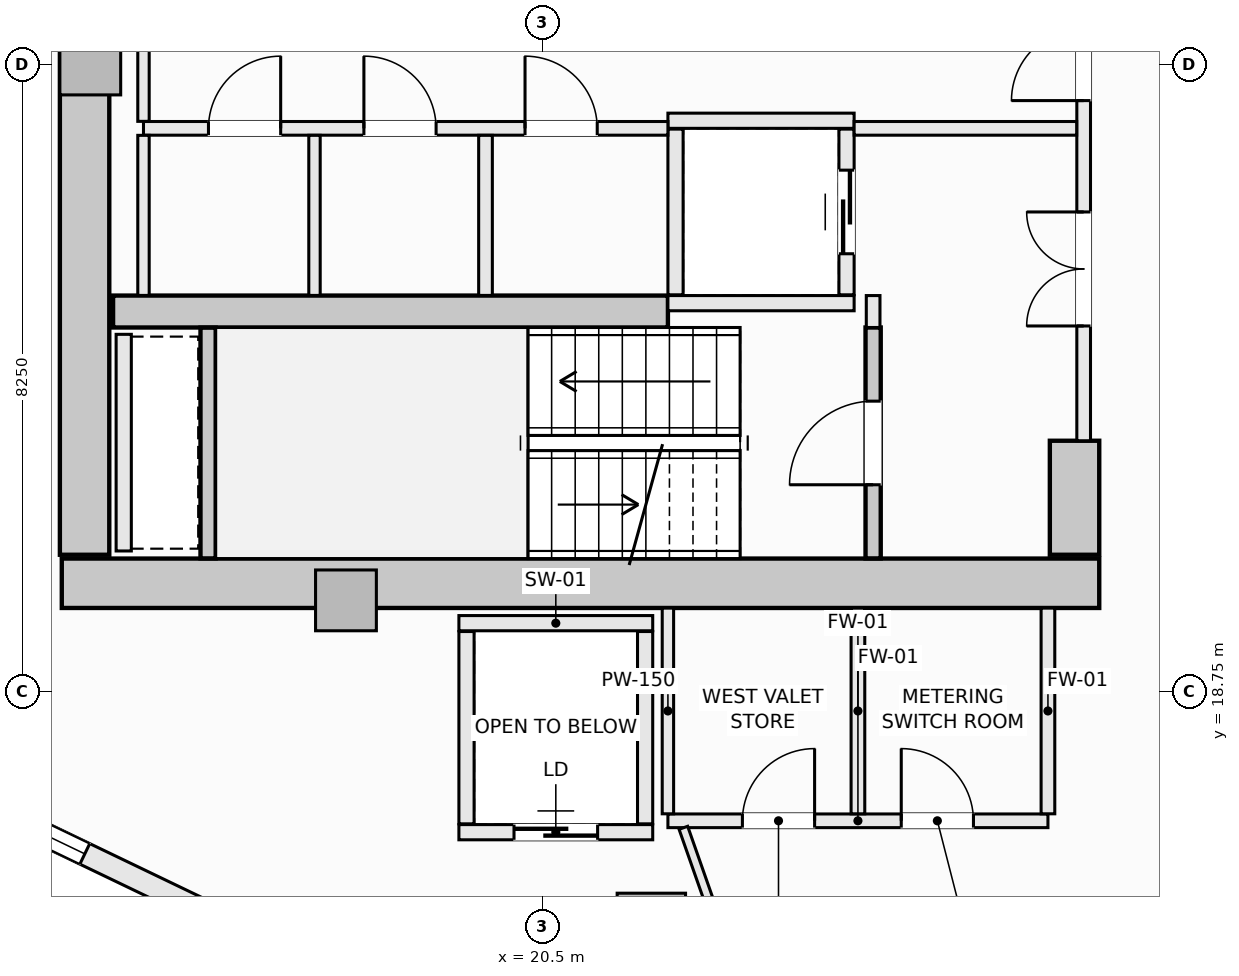
"""IFC4 building model, lengths in metres.
Left out: names, types, materials, properties, quantities, classifications, styles, units other than length and angle.
Written with IfcOpenShell. Run it as: python <this file> out.ifc"""

import sys

from ifc_helpers import new_model, si_unit, direction, frame, frame_2d, origin, origin_2d, place, context, subcontext, project, spatial, rectangle, extrude, element, fill, save


model = new_model("IFC4")
c1 = context("Model", 3, precision=1e-05, world=origin(), true_north=direction((0.0, 1.0)))
c2 = subcontext(c1, "Body", "Model", "MODEL_VIEW")
j1 = project(units=[si_unit("LENGTHUNIT", "METRE"), si_unit("PLANEANGLEUNIT", "RADIAN")], contexts=[c1])
p1 = place(None, origin())
s1 = spatial("IfcSite", under=j1, at=p1, CompositionType="ELEMENT")
p2 = place(p1, origin())
s2 = spatial("IfcBuilding", under=s1, at=p2, CompositionType="ELEMENT")
p3 = place(p2, frame((0.0, 0.0, 159.7)))
s3 = spatial("IfcBuildingStorey", under=s2, at=p3, CompositionType="ELEMENT", Elevation=159.7)
p4 = place(p3, frame((14.175, 20.175, -0.27), z_axis=(0.0, 0.0, 1.0), x_axis=(1.0, 0.0, 0.0)))
e1 = element("IfcWall", 1, at=p4, inside=s3, PredefinedType="SHEAR", context=c2, shape_type="SweptSolid", body=[
    extrude(rectangle(XDim=13.65, YDim=0.65, at=frame_2d((6.825, 0.0))), origin(), (0.0, 0.0, 1.0), 3.4),
])
p5 = place(p3, frame((14.475, 20.55, -0.27), z_axis=(0.0, 0.0, 1.0), x_axis=(0.0, 1.0, 0.0)))
e2 = element("IfcWall", 2, at=p5, inside=s3, PredefinedType="SHEAR", context=c2, shape_type="SweptSolid", body=[
    extrude(rectangle(XDim=12.9, YDim=0.65, at=frame_2d((6.45, 0.0))), origin(), (0.0, 0.0, 1.0), 3.4),
])
p6 = place(p3, frame((27.5, 20.55, -0.27), z_axis=(0.0, 0.0, 1.0), x_axis=(0.0, 1.0, 0.0)))
e3 = element("IfcWall", 3, at=p6, inside=s3, PredefinedType="SHEAR", context=c2, shape_type="SweptSolid", body=[
    extrude(rectangle(XDim=1.5, YDim=0.65, at=frame_2d((0.75, 0.0))), origin(), (0.0, 0.0, 1.0), 3.4),
])
p7 = place(p3, frame((14.85, 23.75, -0.27), z_axis=(0.0, 0.0, 1.0), x_axis=(1.0, 0.0, 0.0)))
e4 = element("IfcWall", 4, at=p7, inside=s3, PredefinedType="SHEAR", context=c2, shape_type="SweptSolid", body=[
    extrude(rectangle(XDim=7.3, YDim=0.42, at=frame_2d((3.65, 0.0))), origin(), (0.0, 0.0, 1.0), 3.4),
])
p8 = place(p3, frame((21.932, 15.648, -0.27), z_axis=(0.0, 0.0, 1.0), x_axis=(1.0, 0.0, 0.0)))
e5 = element("IfcColumn", 5, at=p8, inside=s3, PredefinedType="COLUMN", context=c2, shape_type="SweptSolid", body=[
    extrude(rectangle(XDim=0.9, YDim=0.9, at=origin_2d()), origin(), (0.0, 0.0, 1.0), 3.4),
])
for number, where, z_axis, x_axis in (
    (6, (14.55, 27.0, -0.27), (0.0, 0.0, 1.0), (1.0, 0.0, 0.0)),
    (7, (17.914, 19.95, -0.27), (0.0, 0.0, 1.0), (1.0, 0.0, 0.0)),
):
    element("IfcColumn", number, at=place(p3, frame(where, z_axis=z_axis, x_axis=x_axis)), inside=s3, PredefinedType="PILASTER", context=c2, shape_type="SweptSolid", body=[
        extrude(rectangle(XDim=0.8, YDim=0.8, at=origin_2d()), origin(), (0.0, 0.0, 1.0), 3.4),
    ])
p9 = place(p3, frame((11.127, 18.225, 0.0), z_axis=(0.0, 0.0, 1.0), x_axis=(0.901353070301, -0.433085029363, 0.0)))
e8 = element("IfcWall", 8, at=p9, inside=s3, PredefinedType="SOLIDWALL", context=c2, shape_type="SweptSolid", body=[
    extrude(rectangle(XDim=5.336, YDim=0.3, at=frame_2d((2.668, 0.0))), origin(), (0.0, 0.0, 1.0), 2.653),
])
p10 = place(p9, frame((1.618, 0.0, 0.74)))
e9 = element("IfcOpeningElement", 9, at=p10, cuts=e8, PredefinedType="OPENING", context=c2, shape_type="SweptSolid", body=[
    extrude(rectangle(XDim=2.1, YDim=1.7, at=frame_2d((1.05, 0.85))), frame((0.0, 0.16, 0.0), z_axis=(0.0, -1.0, 0.0), x_axis=(1.0, 0.0, 0.0)), (0.0, 0.0, 1.0), 0.32),
])
p11 = place(p3, frame((24.85, 20.502, -0.27), z_axis=(0.0, 0.0, 1.0), x_axis=(0.0, 1.0, 0.0)))
e10 = element("IfcWall", 10, at=p11, inside=s3, PredefinedType="SHEAR", context=c2, shape_type="SweptSolid", body=[
    extrude(rectangle(XDim=3.038, YDim=0.2, at=frame_2d((1.519, 0.0))), origin(), (0.0, 0.0, 1.0), 3.4),
])
p12 = place(p11, frame((0.969, 0.0, 0.27)))
e11 = element("IfcOpeningElement", 11, at=p12, cuts=e10, PredefinedType="OPENING", context=c2, shape_type="SweptSolid", body=[
    extrude(rectangle(XDim=1.1, YDim=2.15, at=frame_2d((0.55, 1.075))), frame((0.0, 0.11, 0.0), z_axis=(0.0, -1.0, 0.0), x_axis=(1.0, 0.0, 0.0)), (0.0, 0.0, 1.0), 0.22),
])
p13 = place(p3, frame((16.1, 20.502, -0.27), z_axis=(0.0, 0.0, 1.0), x_axis=(0.0, 1.0, 0.0)))
e12 = element("IfcWall", 12, at=p13, inside=s3, PredefinedType="SHEAR", context=c2, shape_type="SweptSolid", body=[
    extrude(rectangle(XDim=3.036, YDim=0.2, at=frame_2d((1.518, 0.0))), origin(), (0.0, 0.0, 1.0), 3.4),
])
for number, where, z_axis, x_axis in (
    (13, (22.15, 26.26, 0.0), (0.0, 0.0, 1.0), (1.0, 0.0, 0.0)),
    (14, (22.15, 23.86, 0.0), (0.0, 0.0, 1.0), (1.0, 0.0, 0.0)),
):
    element("IfcWall", number, at=place(p3, frame(where, z_axis=z_axis, x_axis=x_axis)), inside=s3, PredefinedType="SOLIDWALL", context=c2, shape_type="SweptSolid", body=[
        extrude(rectangle(XDim=2.45, YDim=0.2, at=frame_2d((1.225, 0.0))), origin(), (0.0, 0.0, 1.0), 3.13),
    ])
p14 = place(p3, frame((22.25, 23.97, 0.0), z_axis=(0.0, 0.0, 1.0), x_axis=(0.0, 1.0, 0.0)))
e15 = element("IfcWall", 15, at=p14, inside=s3, PredefinedType="SOLIDWALL", context=c2, shape_type="SweptSolid", body=[
    extrude(rectangle(XDim=2.18, YDim=0.2, at=frame_2d((1.09, 0.0))), origin(), (0.0, 0.0, 1.0), 3.13),
])
p15 = place(p3, frame((24.5, 23.97, 0.0), z_axis=(0.0, 0.0, 1.0), x_axis=(0.0, 1.0, 0.0)))
e16 = element("IfcWall", 16, at=p15, inside=s3, PredefinedType="SOLIDWALL", context=c2, shape_type="SweptSolid", body=[
    extrude(rectangle(XDim=2.18, YDim=0.2, at=frame_2d((1.09, 0.0))), origin(), (0.0, 0.0, 1.0), 3.13),
])
p16 = place(p15, frame((0.54, 0.0, 0.0)))
e17 = element("IfcOpeningElement", 17, at=p16, cuts=e16, PredefinedType="OPENING", context=c2, shape_type="SweptSolid", body=[
    extrude(rectangle(XDim=1.1, YDim=2.2, at=frame_2d((0.55, 1.1))), frame((0.0, 0.11, 0.0), z_axis=(0.0, -1.0, 0.0), x_axis=(1.0, 0.0, 0.0)), (0.0, 0.0, 1.0), 0.22),
])
p17 = place(p3, frame((19.4, 19.65, 0.0), z_axis=(0.0, 0.0, 1.0), x_axis=(1.0, 0.0, 0.0)))
e18 = element("IfcWall", 18, at=p17, inside=s3, PredefinedType="SOLIDWALL", context=c2, shape_type="SweptSolid", body=[
    extrude(rectangle(XDim=2.55, YDim=0.2, at=frame_2d((1.275, 0.0))), origin(), (0.0, 0.0, 1.0), 3.13),
])
p18 = place(p3, frame((19.4, 16.9, 0.0), z_axis=(0.0, 0.0, 1.0), x_axis=(1.0, 0.0, 0.0)))
e19 = element("IfcWall", 19, at=p18, inside=s3, PredefinedType="SOLIDWALL", context=c2, shape_type="SweptSolid", body=[
    extrude(rectangle(XDim=2.55, YDim=0.2, at=frame_2d((1.275, 0.0))), origin(), (0.0, 0.0, 1.0), 3.13),
])
p19 = place(p18, frame((0.725, 0.0, 0.0)))
e20 = element("IfcOpeningElement", 20, at=p19, cuts=e19, PredefinedType="OPENING", context=c2, shape_type="SweptSolid", body=[
    extrude(rectangle(XDim=1.1, YDim=2.2, at=frame_2d((0.55, 1.1))), frame((0.0, 0.11, 0.0), z_axis=(0.0, -1.0, 0.0), x_axis=(1.0, 0.0, 0.0)), (0.0, 0.0, 1.0), 0.22),
])
for number, where, z_axis, x_axis in (
    (21, (19.5, 17.01, 0.0), (0.0, 0.0, 1.0), (0.0, 1.0, 0.0)),
    (22, (21.85, 17.01, 0.0), (0.0, 0.0, 1.0), (0.0, 1.0, 0.0)),
):
    element("IfcWall", number, at=place(p3, frame(where, z_axis=z_axis, x_axis=x_axis)), inside=s3, PredefinedType="SOLIDWALL", context=c2, shape_type="SweptSolid", body=[
        extrude(rectangle(XDim=2.53, YDim=0.2, at=frame_2d((1.265, 0.0))), origin(), (0.0, 0.0, 1.0), 3.13),
    ])
p20 = place(p3, frame((14.99, 20.6, 0.0), z_axis=(0.0, 0.0, 1.0), x_axis=(0.0, 1.0, 0.0)))
e23 = element("IfcWall", 23, at=p20, inside=s3, PredefinedType="SOLIDWALL", context=c2, shape_type="SweptSolid", body=[
    extrude(rectangle(XDim=2.85, YDim=0.2, at=frame_2d((1.425, 0.0))), origin(), (0.0, 0.0, 1.0), 3.13),
])
p21 = place(p3, frame((24.85, 23.54, 0.0), z_axis=(0.0, 0.0, 1.0), x_axis=(0.0, 1.0, 0.0)))
e24 = element("IfcWall", 24, at=p21, inside=s3, PredefinedType="SOLIDWALL", context=c2, shape_type="SweptSolid", body=[
    extrude(rectangle(XDim=0.42, YDim=0.18, at=frame_2d((0.21, 0.0))), origin(), (0.0, 0.0, 1.0), 3.13),
])
p22 = place(p3, frame((27.62, 22.05, 0.0), z_axis=(0.0, 0.0, 1.0), x_axis=(0.0, 1.0, 0.0)))
e25 = element("IfcWall", 25, at=p22, inside=s3, PredefinedType="SOLIDWALL", context=c2, shape_type="SweptSolid", body=[
    extrude(rectangle(XDim=9.9, YDim=0.18, at=frame_2d((4.95, 0.0))), origin(), (0.0, 0.0, 1.0), 3.13),
])
p23 = place(p22, frame((4.475, 0.0, 0.0)))
e26 = element("IfcOpeningElement", 26, at=p23, cuts=e25, PredefinedType="OPENING", context=c2, shape_type="SweptSolid", body=[
    extrude(rectangle(XDim=0.95, YDim=2.1, at=frame_2d((0.475, 1.05))), frame((0.0, 0.1, 0.0), z_axis=(0.0, -1.0, 0.0), x_axis=(1.0, 0.0, 0.0)), (0.0, 0.0, 1.0), 0.2),
])
p24 = place(p22, frame((6.89, 0.0, 0.0)))
e27 = element("IfcOpeningElement", 27, at=p24, cuts=e25, PredefinedType="OPENING", context=c2, shape_type="SweptSolid", body=[
    extrude(rectangle(XDim=1.5, YDim=2.2, at=frame_2d((0.75, 1.1))), frame((0.0, 0.1, 0.0), z_axis=(0.0, -1.0, 0.0), x_axis=(1.0, 0.0, 0.0)), (0.0, 0.0, 1.0), 0.2),
])
p25 = place(p22, frame((1.51, 0.0, 0.0)))
e28 = element("IfcOpeningElement", 28, at=p25, cuts=e25, PredefinedType="OPENING", context=c2, shape_type="SweptSolid", body=[
    extrude(rectangle(XDim=1.5, YDim=2.2, at=frame_2d((0.75, 1.1))), frame((0.0, 0.1, 0.0), z_axis=(0.0, -1.0, 0.0), x_axis=(1.0, 0.0, 0.0)), (0.0, 0.0, 1.0), 0.2),
])
p26 = place(p3, frame((15.25, 26.16, 0.0), z_axis=(0.0, 0.0, 1.0), x_axis=(1.0, 0.0, 0.0)))
e29 = element("IfcWall", 29, at=p26, inside=s3, PredefinedType="SOLIDWALL", context=c2, shape_type="SweptSolid", body=[
    extrude(rectangle(XDim=6.9, YDim=0.18, at=frame_2d((3.45, 0.0))), origin(), (0.0, 0.0, 1.0), 3.13),
])
p27 = place(p26, frame((5.02, 0.0, 0.0)))
e30 = element("IfcOpeningElement", 30, at=p27, cuts=e29, PredefinedType="OPENING", context=c2, shape_type="SweptSolid", body=[
    extrude(rectangle(XDim=0.95, YDim=2.1, at=frame_2d((0.475, 1.05))), frame((0.0, 0.1, 0.0), z_axis=(0.0, -1.0, 0.0), x_axis=(1.0, 0.0, 0.0)), (0.0, 0.0, 1.0), 0.2),
])
p28 = place(p26, frame((0.855, 0.0, 0.0)))
e31 = element("IfcOpeningElement", 31, at=p28, cuts=e29, PredefinedType="OPENING", context=c2, shape_type="SweptSolid", body=[
    extrude(rectangle(XDim=0.95, YDim=2.1, at=frame_2d((0.475, 1.05))), frame((0.0, 0.1, 0.0), z_axis=(0.0, -1.0, 0.0), x_axis=(1.0, 0.0, 0.0)), (0.0, 0.0, 1.0), 0.2),
])
p29 = place(p26, frame((2.9, 0.0, 0.0)))
e32 = element("IfcOpeningElement", 32, at=p29, cuts=e29, PredefinedType="OPENING", context=c2, shape_type="SweptSolid", body=[
    extrude(rectangle(XDim=0.95, YDim=2.1, at=frame_2d((0.475, 1.05))), frame((0.0, 0.1, 0.0), z_axis=(0.0, -1.0, 0.0), x_axis=(1.0, 0.0, 0.0)), (0.0, 0.0, 1.0), 0.2),
])
p30 = place(p3, frame((24.6, 26.16, 0.0), z_axis=(0.0, 0.0, 1.0), x_axis=(1.0, 0.0, 0.0)))
e33 = element("IfcWall", 33, at=p30, inside=s3, PredefinedType="SOLIDWALL", context=c2, shape_type="SweptSolid", body=[
    extrude(rectangle(XDim=2.928, YDim=0.18, at=frame_2d((1.464, 0.0))), origin(), (0.0, 0.0, 1.0), 3.13),
])
p31 = place(p3, frame((15.25, 23.962, 0.0), z_axis=(0.0, 0.0, 1.0), x_axis=(0.0, 1.0, 0.0)))
e34 = element("IfcWall", 34, at=p31, inside=s3, PredefinedType="PARTITIONING", context=c2, shape_type="SweptSolid", body=[
    extrude(rectangle(XDim=2.106, YDim=0.15, at=frame_2d((1.053, 0.0))), origin(), (0.0, 0.0, 1.0), 3.13),
])
p32 = place(p3, frame((15.25, 26.252, 0.0), z_axis=(0.0, 0.0, 1.0), x_axis=(0.0, 1.0, 0.0)))
e35 = element("IfcWall", 35, at=p32, inside=s3, PredefinedType="PARTITIONING", context=c2, shape_type="SweptSolid", body=[
    extrude(rectangle(XDim=1.496, YDim=0.15, at=frame_2d((0.748, 0.0))), origin(), (0.0, 0.0, 1.0), 3.13),
])
p33 = place(p3, frame((19.75, 23.962, 0.0), z_axis=(0.0, 0.0, 1.0), x_axis=(0.0, 1.0, 0.0)))
e36 = element("IfcWall", 36, at=p33, inside=s3, PredefinedType="SOLIDWALL", context=c2, shape_type="SweptSolid", body=[
    extrude(rectangle(XDim=2.106, YDim=0.18, at=frame_2d((1.053, 0.0))), origin(), (0.0, 0.0, 1.0), 3.13),
])
p34 = place(p3, frame((17.5, 23.962, 0.0), z_axis=(0.0, 0.0, 1.0), x_axis=(0.0, 1.0, 0.0)))
e37 = element("IfcWall", 37, at=p34, inside=s3, PredefinedType="PARTITIONING", context=c2, shape_type="SweptSolid", body=[
    extrude(rectangle(XDim=2.106, YDim=0.15, at=frame_2d((1.053, 0.0))), origin(), (0.0, 0.0, 1.0), 3.13),
])
p35 = place(p3, frame((22.15, 17.05, 0.0), z_axis=(0.0, 0.0, 1.0), x_axis=(1.0, 0.0, 0.0)))
e38 = element("IfcWall", 38, at=p35, inside=s3, PredefinedType="SOLIDWALL", context=c2, shape_type="SweptSolid", body=[
    extrude(rectangle(XDim=5.0, YDim=0.18, at=frame_2d((2.5, 0.0))), origin(), (0.0, 0.0, 1.0), 3.13),
])
p36 = place(p35, frame((0.98, 0.0, 0.0)))
e39 = element("IfcOpeningElement", 39, at=p36, cuts=e38, PredefinedType="OPENING", context=c2, shape_type="SweptSolid", body=[
    extrude(rectangle(XDim=0.95, YDim=2.1, at=frame_2d((0.475, 1.05))), frame((0.0, 0.1, 0.0), z_axis=(0.0, -1.0, 0.0), x_axis=(1.0, 0.0, 0.0)), (0.0, 0.0, 1.0), 0.2),
])
p37 = place(p35, frame((3.07, 0.0, 0.0)))
e40 = element("IfcOpeningElement", 40, at=p37, cuts=e38, PredefinedType="OPENING", context=c2, shape_type="SweptSolid", body=[
    extrude(rectangle(XDim=0.95, YDim=2.1, at=frame_2d((0.475, 1.05))), frame((0.0, 0.1, 0.0), z_axis=(0.0, -1.0, 0.0), x_axis=(1.0, 0.0, 0.0)), (0.0, 0.0, 1.0), 0.2),
])
p38 = place(p3, frame((22.15, 17.142, 0.0), z_axis=(0.0, 0.0, 1.0), x_axis=(0.0, 1.0, 0.0)))
e41 = element("IfcWall", 41, at=p38, inside=s3, PredefinedType="PARTITIONING", context=c2, shape_type="SweptSolid", body=[
    extrude(rectangle(XDim=2.706, YDim=0.15, at=frame_2d((1.353, 0.0))), origin(), (0.0, 0.0, 1.0), 3.13),
])
for number, where, z_axis, x_axis in (
    (42, (24.65, 17.142, 0.0), (0.0, 0.0, 1.0), (0.0, 1.0, 0.0)),
    (43, (27.15, 17.142, 0.0), (0.0, 0.0, 1.0), (0.0, 1.0, 0.0)),
):
    element("IfcWall", number, at=place(p3, frame(where, z_axis=z_axis, x_axis=x_axis)), inside=s3, PredefinedType="SOLIDWALL", context=c2, shape_type="SweptSolid", body=[
        extrude(rectangle(XDim=2.706, YDim=0.18, at=frame_2d((1.353, 0.0))), origin(), (0.0, 0.0, 1.0), 3.13),
    ])
p39 = place(p3, frame((22.353, 16.958, 0.0), z_axis=(0.0, 0.0, 1.0), x_axis=(0.331370038458, -0.943500873138, 0.0)))
e44 = element("IfcWall", 44, at=p39, inside=s3, PredefinedType="PARTITIONING", context=c2, shape_type="SweptSolid", body=[
    extrude(rectangle(XDim=1.216, YDim=0.12, at=frame_2d((0.608, 0.0))), origin(), (0.0, 0.0, 1.0), 3.13),
])
p40 = place(p10, origin())
e45 = element("IfcWindow", 45, at=p40, inside=s3, PartitioningType="SINGLE_PANEL", PredefinedType="WINDOW", context=c2, shape_type="SweptSolid", body=[
    extrude(rectangle(XDim=2.1, YDim=1.7, at=frame_2d((1.05, 0.85))), frame((0.0, 0.03, 0.0), z_axis=(0.0, -1.0, 0.0), x_axis=(1.0, 0.0, 0.0)), (0.0, 0.0, 1.0), 0.06),
])
fill(e9, e45)
p41 = place(p12, origin())
e46 = element("IfcDoor", 46, at=p41, inside=s3, OperationType="SINGLE_SWING_LEFT", PredefinedType="DOOR", context=c2, shape_type="SweptSolid", body=[
    extrude(rectangle(XDim=1.1, YDim=2.15, at=frame_2d((0.55, 1.075))), frame((0.0, 0.025, 0.0), z_axis=(0.0, -1.0, 0.0), x_axis=(1.0, 0.0, 0.0)), (0.0, 0.0, 1.0), 0.05),
])
fill(e11, e46)
p42 = place(p16, origin())
e47 = element("IfcDoor", 47, at=p42, inside=s3, OperationType="SLIDING_TO_LEFT", PredefinedType="DOOR", context=c2, shape_type="SweptSolid", body=[
    extrude(rectangle(XDim=1.1, YDim=2.2, at=frame_2d((0.55, 1.1))), frame((0.0, 0.025, 0.0), z_axis=(0.0, -1.0, 0.0), x_axis=(1.0, 0.0, 0.0)), (0.0, 0.0, 1.0), 0.05),
])
fill(e17, e47)
p43 = place(p19, origin())
e48 = element("IfcDoor", 48, at=p43, inside=s3, OperationType="SLIDING_TO_LEFT", PredefinedType="DOOR", context=c2, shape_type="SweptSolid", body=[
    extrude(rectangle(XDim=1.1, YDim=2.2, at=frame_2d((0.55, 1.1))), frame((0.0, 0.025, 0.0), z_axis=(0.0, -1.0, 0.0), x_axis=(1.0, 0.0, 0.0)), (0.0, 0.0, 1.0), 0.05),
])
fill(e20, e48)
p44 = place(p23, origin())
e49 = element("IfcDoor", 49, at=p44, inside=s3, OperationType="SINGLE_SWING_LEFT", PredefinedType="DOOR", context=c2, shape_type="SweptSolid", body=[
    extrude(rectangle(XDim=0.95, YDim=2.1, at=frame_2d((0.475, 1.05))), frame((0.0, 0.025, 0.0), z_axis=(0.0, -1.0, 0.0), x_axis=(1.0, 0.0, 0.0)), (0.0, 0.0, 1.0), 0.05),
])
fill(e26, e49)
p45 = place(p25, origin())
e50 = element("IfcDoor", 50, at=p45, inside=s3, OperationType="DOUBLE_DOOR_SINGLE_SWING", PredefinedType="DOOR", context=c2, shape_type="SweptSolid", body=[
    extrude(rectangle(XDim=1.5, YDim=2.2, at=frame_2d((0.75, 1.1))), frame((0.0, 0.025, 0.0), z_axis=(0.0, -1.0, 0.0), x_axis=(1.0, 0.0, 0.0)), (0.0, 0.0, 1.0), 0.05),
])
fill(e28, e50)
p46 = place(p27, origin())
e51 = element("IfcDoor", 51, at=p46, inside=s3, OperationType="SINGLE_SWING_LEFT", PredefinedType="DOOR", context=c2, shape_type="SweptSolid", body=[
    extrude(rectangle(XDim=0.95, YDim=2.1, at=frame_2d((0.475, 1.05))), frame((0.0, 0.025, 0.0), z_axis=(0.0, -1.0, 0.0), x_axis=(1.0, 0.0, 0.0)), (0.0, 0.0, 1.0), 0.05),
])
fill(e30, e51)
p47 = place(p28, origin())
e52 = element("IfcDoor", 52, at=p47, inside=s3, OperationType="SINGLE_SWING_RIGHT", PredefinedType="DOOR", context=c2, shape_type="SweptSolid", body=[
    extrude(rectangle(XDim=0.95, YDim=2.1, at=frame_2d((0.475, 1.05))), frame((0.0, 0.025, 0.0), z_axis=(0.0, -1.0, 0.0), x_axis=(1.0, 0.0, 0.0)), (0.0, 0.0, 1.0), 0.05),
])
fill(e31, e52)
p48 = place(p29, origin())
e53 = element("IfcDoor", 53, at=p48, inside=s3, OperationType="SINGLE_SWING_LEFT", PredefinedType="DOOR", context=c2, shape_type="SweptSolid", body=[
    extrude(rectangle(XDim=0.95, YDim=2.1, at=frame_2d((0.475, 1.05))), frame((0.0, 0.025, 0.0), z_axis=(0.0, -1.0, 0.0), x_axis=(1.0, 0.0, 0.0)), (0.0, 0.0, 1.0), 0.05),
])
fill(e32, e53)
p49 = place(p36, origin())
e54 = element("IfcDoor", 54, at=p49, inside=s3, OperationType="SINGLE_SWING_RIGHT", PredefinedType="DOOR", context=c2, shape_type="SweptSolid", body=[
    extrude(rectangle(XDim=0.95, YDim=2.1, at=frame_2d((0.475, 1.05))), frame((0.0, 0.025, 0.0), z_axis=(0.0, -1.0, 0.0), x_axis=(1.0, 0.0, 0.0)), (0.0, 0.0, 1.0), 0.05),
])
fill(e39, e54)
p50 = place(p37, origin())
e55 = element("IfcDoor", 55, at=p50, inside=s3, OperationType="SINGLE_SWING_LEFT", PredefinedType="DOOR", context=c2, shape_type="SweptSolid", body=[
    extrude(rectangle(XDim=0.95, YDim=2.1, at=frame_2d((0.475, 1.05))), frame((0.0, 0.025, 0.0), z_axis=(0.0, -1.0, 0.0), x_axis=(1.0, 0.0, 0.0)), (0.0, 0.0, 1.0), 0.05),
])
fill(e40, e55)
save(model, sys.argv[1])
